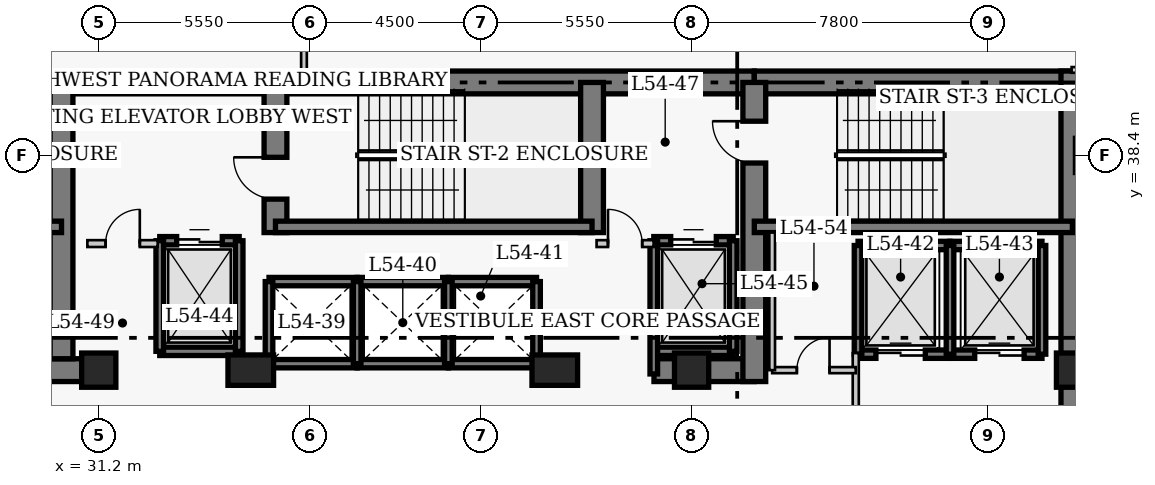
"""IFC4 building model, lengths in metres.
Left out: names, types, materials, properties, quantities, classifications, styles, units other than length and angle.
Written with IfcOpenShell. Run it as: python <this file> out.ifc"""

import sys

from ifc_helpers import new_model, si_unit, direction, frame, frame_2d, origin, origin_2d, place, context, subcontext, project, spatial, rectangle, extrude, element, fill, save


model = new_model("IFC4")
c1 = context("Model", 3, precision=1e-05, world=origin(), true_north=direction((0.0, 1.0)))
c2 = subcontext(c1, "Body", "Model", "MODEL_VIEW")
j1 = project(units=[si_unit("LENGTHUNIT", "METRE"), si_unit("PLANEANGLEUNIT", "RADIAN")], contexts=[c1])
p1 = place(None, origin())
s1 = spatial("IfcSite", under=j1, at=p1, CompositionType="ELEMENT")
p2 = place(p1, origin())
s2 = spatial("IfcBuilding", under=s1, at=p2, CompositionType="ELEMENT")
p3 = place(p2, frame((0.0, 0.0, 216.3)))
s3 = spatial("IfcBuildingStorey", under=s2, at=p3, CompositionType="ELEMENT", Elevation=216.3)
p4 = place(p3, frame((21.6, 40.32, 0.0), z_axis=(0.0, 0.0, 1.0), x_axis=(1.0, 0.0, 0.0)))
e1 = element("IfcWall", 1, at=p4, inside=s3, PredefinedType="SHEAR", context=c2, shape_type="SweptSolid", body=[
    extrude(rectangle(XDim=14.25, YDim=0.6, at=frame_2d((7.125, 0.0))), origin(), (0.0, 0.0, 1.0), 3.9),
])
p5 = place(p3, frame((35.85, 40.32, 0.0), z_axis=(0.0, 0.0, 1.0), x_axis=(1.0, 0.0, 0.0)))
e2 = element("IfcWall", 2, at=p5, inside=s3, PredefinedType="SHEAR", context=c2, shape_type="SweptSolid", body=[
    extrude(rectangle(XDim=12.6, YDim=0.6, at=frame_2d((6.3, 0.0))), origin(), (0.0, 0.0, 1.0), 3.9),
])
p6 = place(p3, frame((48.45, 40.32, 0.0), z_axis=(0.0, 0.0, 1.0), x_axis=(1.0, 0.0, 0.0)))
e3 = element("IfcWall", 3, at=p6, inside=s3, PredefinedType="SHEAR", context=c2, shape_type="SweptSolid", body=[
    extrude(rectangle(XDim=8.67, YDim=0.6, at=frame_2d((4.335, 0.0))), origin(), (0.0, 0.0, 1.0), 3.9),
])
p7 = place(p3, frame((56.82, 27.05, 0.0), z_axis=(0.0, 0.0, 1.0), x_axis=(0.0, 1.0, 0.0)))
e4 = element("IfcWall", 4, at=p7, inside=s3, PredefinedType="SHEAR", context=c2, shape_type="SweptSolid", body=[
    extrude(rectangle(XDim=13.57, YDim=0.6, at=frame_2d((6.785, 0.0))), origin(), (0.0, 0.0, 1.0), 3.9),
])
p8 = place(p3, frame((28.45, 32.75, 0.0), z_axis=(0.0, 0.0, 1.0), x_axis=(1.0, 0.0, 0.0)))
e5 = element("IfcWall", 5, at=p8, inside=s3, PredefinedType="SHEAR", context=c2, shape_type="SweptSolid", body=[
    extrude(rectangle(XDim=2.4, YDim=0.6, at=frame_2d((1.2, 0.0))), origin(), (0.0, 0.0, 1.0), 3.9),
])
p9 = place(p3, frame((45.81, 32.75, 0.0), z_axis=(0.0, 0.0, 1.0), x_axis=(1.0, 0.0, 0.0)))
e6 = element("IfcWall", 6, at=p9, inside=s3, PredefinedType="SHEAR", context=c2, shape_type="SweptSolid", body=[
    extrude(rectangle(XDim=2.64, YDim=0.6, at=frame_2d((1.32, 0.0))), origin(), (0.0, 0.0, 1.0), 3.9),
])
p10 = place(p3, frame((30.22, 33.05, 0.0), z_axis=(0.0, 0.0, 1.0), x_axis=(0.0, 1.0, 0.0)))
e7 = element("IfcWall", 7, at=p10, inside=s3, PredefinedType="SHEAR", context=c2, shape_type="SweptSolid", body=[
    extrude(rectangle(XDim=7.27, YDim=0.6, at=frame_2d((3.635, 0.0))), origin(), (0.0, 0.0, 1.0), 3.9),
])
p11 = place(p3, frame((35.85, 36.37, 0.0), z_axis=(0.0, 0.0, 1.0), x_axis=(0.0, 1.0, 0.0)))
e8 = element("IfcWall", 8, at=p11, inside=s3, PredefinedType="SHEAR", context=c2, shape_type="SweptSolid", body=[
    extrude(rectangle(XDim=3.95, YDim=0.6, at=frame_2d((1.975, 0.0))), origin(), (0.0, 0.0, 1.0), 3.9),
])
p12 = place(p11, frame((0.88, 0.0, 0.0)))
e9 = element("IfcOpeningElement", 9, at=p12, cuts=e8, PredefinedType="OPENING", context=c2, shape_type="SweptSolid", body=[
    extrude(rectangle(XDim=1.1, YDim=2.15, at=frame_2d((0.55, 1.075))), frame((0.0, 0.31, 0.0), z_axis=(0.0, -1.0, 0.0), x_axis=(1.0, 0.0, 0.0)), (0.0, 0.0, 1.0), 0.62),
])
p13 = place(p3, frame((44.18, 36.37, 0.0), z_axis=(0.0, 0.0, 1.0), x_axis=(0.0, 1.0, 0.0)))
e10 = element("IfcWall", 10, at=p13, inside=s3, PredefinedType="SHEAR", context=c2, shape_type="SweptSolid", body=[
    extrude(rectangle(XDim=3.95, YDim=0.6, at=frame_2d((1.975, 0.0))), origin(), (0.0, 0.0, 1.0), 3.9),
])
p14 = place(p3, frame((48.45, 32.45, 0.0), z_axis=(0.0, 0.0, 1.0), x_axis=(0.0, 1.0, 0.0)))
e11 = element("IfcWall", 11, at=p14, inside=s3, PredefinedType="SHEAR", context=c2, shape_type="SweptSolid", body=[
    extrude(rectangle(XDim=7.87, YDim=0.6, at=frame_2d((3.935, 0.0))), origin(), (0.0, 0.0, 1.0), 3.9),
])
p15 = place(p14, frame((5.75, 0.0, 0.0)))
e12 = element("IfcOpeningElement", 12, at=p15, cuts=e11, PredefinedType="OPENING", context=c2, shape_type="SweptSolid", body=[
    extrude(rectangle(XDim=1.1, YDim=2.15, at=frame_2d((0.55, 1.075))), frame((0.0, 0.31, 0.0), z_axis=(0.0, -1.0, 0.0), x_axis=(1.0, 0.0, 0.0)), (0.0, 0.0, 1.0), 0.62),
])
p16 = place(p3, frame((21.9, 36.52, 0.0), z_axis=(0.0, 0.0, 1.0), x_axis=(1.0, 0.0, 0.0)))
e13 = element("IfcWall", 13, at=p16, inside=s3, PredefinedType="SHEAR", context=c2, shape_type="SweptSolid", body=[
    extrude(rectangle(XDim=8.32, YDim=0.3, at=frame_2d((4.16, 0.0))), origin(), (0.0, 0.0, 1.0), 3.9),
])
p17 = place(p16, frame((0.9, 0.0, 0.0)))
e14 = element("IfcOpeningElement", 14, at=p17, cuts=e13, PredefinedType="OPENING", context=c2, shape_type="SweptSolid", body=[
    extrude(rectangle(XDim=1.1, YDim=2.15, at=frame_2d((0.55, 1.075))), frame((0.0, 0.16, 0.0), z_axis=(0.0, -1.0, 0.0), x_axis=(1.0, 0.0, 0.0)), (0.0, 0.0, 1.0), 0.32),
])
p18 = place(p3, frame((35.85, 36.52, 0.0), z_axis=(0.0, 0.0, 1.0), x_axis=(1.0, 0.0, 0.0)))
e15 = element("IfcWall", 15, at=p18, inside=s3, PredefinedType="SHEAR", context=c2, shape_type="SweptSolid", body=[
    extrude(rectangle(XDim=8.33, YDim=0.3, at=frame_2d((4.165, 0.0))), origin(), (0.0, 0.0, 1.0), 3.9),
])
p19 = place(p3, frame((48.45, 36.52, 0.0), z_axis=(0.0, 0.0, 1.0), x_axis=(1.0, 0.0, 0.0)))
e16 = element("IfcWall", 16, at=p19, inside=s3, PredefinedType="SHEAR", context=c2, shape_type="SweptSolid", body=[
    extrude(rectangle(XDim=8.37, YDim=0.3, at=frame_2d((4.185, 0.0))), origin(), (0.0, 0.0, 1.0), 3.9),
])
p20 = place(p3, frame((31.2, 32.75, 0.0), z_axis=(0.0, 0.0, 1.0), x_axis=(1.0, 0.0, 0.0)))
e17 = element("IfcColumn", 17, at=p20, inside=s3, PredefinedType="COLUMN", context=c2, shape_type="SweptSolid", body=[
    extrude(rectangle(XDim=0.9, YDim=0.9, at=origin_2d()), origin(), (0.0, 0.0, 1.0), 3.9),
])
for number, where, z_axis, x_axis in (
    (18, (35.2, 32.75, 0.0), (0.0, 0.0, 1.0), (1.0, 0.0, 0.0)),
    (19, (43.2, 32.75, 0.0), (0.0, 0.0, 1.0), (1.0, 0.0, 0.0)),
):
    element("IfcColumn", number, at=place(p3, frame(where, z_axis=z_axis, x_axis=x_axis)), inside=s3, PredefinedType="COLUMN", context=c2, shape_type="SweptSolid", body=[
        extrude(rectangle(XDim=1.2, YDim=0.8, at=origin_2d()), origin(), (0.0, 0.0, 1.0), 3.9),
    ])
for number, where, z_axis, x_axis in (
    (20, (46.8, 32.75, 0.0), (0.0, 0.0, 1.0), (1.0, 0.0, 0.0)),
    (21, (56.85, 32.75, 0.0), (0.0, 0.0, 1.0), (1.0, 0.0, 0.0)),
):
    element("IfcColumn", number, at=place(p3, frame(where, z_axis=z_axis, x_axis=x_axis)), inside=s3, PredefinedType="COLUMN", context=c2, shape_type="SweptSolid", body=[
        extrude(rectangle(XDim=0.9, YDim=0.9, at=origin_2d()), origin(), (0.0, 0.0, 1.0), 3.9),
    ])
for number, where, z_axis, x_axis in (
    (22, (35.68, 35.08, 0.0), (0.0, 0.0, 1.0), (1.0, 0.0, 0.0)),
    (23, (35.68, 32.92, 0.0), (0.0, 0.0, 1.0), (1.0, 0.0, 0.0)),
):
    element("IfcWall", number, at=place(p3, frame(where, z_axis=z_axis, x_axis=x_axis)), inside=s3, PredefinedType="SHEAR", context=c2, shape_type="SweptSolid", body=[
        extrude(rectangle(XDim=2.32, YDim=0.22, at=frame_2d((1.16, 0.0))), origin(), (0.0, 0.0, 1.0), 3.9),
    ])
p21 = place(p3, frame((35.68, 32.92, 0.0), z_axis=(0.0, 0.0, 1.0), x_axis=(0.0, 1.0, 0.0)))
e24 = element("IfcWall", 24, at=p21, inside=s3, PredefinedType="SHEAR", context=c2, shape_type="SweptSolid", body=[
    extrude(rectangle(XDim=2.16, YDim=0.2, at=frame_2d((1.08, 0.0))), origin(), (0.0, 0.0, 1.0), 3.9),
])
for number, where, z_axis, x_axis in (
    (25, (38.0, 35.08, 0.0), (0.0, 0.0, 1.0), (1.0, 0.0, 0.0)),
    (26, (38.0, 32.92, 0.0), (0.0, 0.0, 1.0), (1.0, 0.0, 0.0)),
):
    element("IfcWall", number, at=place(p3, frame(where, z_axis=z_axis, x_axis=x_axis)), inside=s3, PredefinedType="SHEAR", context=c2, shape_type="SweptSolid", body=[
        extrude(rectangle(XDim=2.4, YDim=0.22, at=frame_2d((1.2, 0.0))), origin(), (0.0, 0.0, 1.0), 3.9),
    ])
p22 = place(p3, frame((38.0, 32.92, 0.0), z_axis=(0.0, 0.0, 1.0), x_axis=(0.0, 1.0, 0.0)))
e27 = element("IfcWall", 27, at=p22, inside=s3, PredefinedType="SHEAR", context=c2, shape_type="SweptSolid", body=[
    extrude(rectangle(XDim=2.16, YDim=0.2, at=frame_2d((1.08, 0.0))), origin(), (0.0, 0.0, 1.0), 3.9),
])
for number, where, z_axis, x_axis in (
    (28, (40.4, 35.08, 0.0), (0.0, 0.0, 1.0), (1.0, 0.0, 0.0)),
    (29, (40.4, 32.92, 0.0), (0.0, 0.0, 1.0), (1.0, 0.0, 0.0)),
):
    element("IfcWall", number, at=place(p3, frame(where, z_axis=z_axis, x_axis=x_axis)), inside=s3, PredefinedType="SHEAR", context=c2, shape_type="SweptSolid", body=[
        extrude(rectangle(XDim=2.32, YDim=0.22, at=frame_2d((1.16, 0.0))), origin(), (0.0, 0.0, 1.0), 3.9),
    ])
for number, where, z_axis, x_axis in (
    (30, (40.4, 32.92, 0.0), (0.0, 0.0, 1.0), (0.0, 1.0, 0.0)),
    (31, (42.72, 32.92, 0.0), (0.0, 0.0, 1.0), (0.0, 1.0, 0.0)),
):
    element("IfcWall", number, at=place(p3, frame(where, z_axis=z_axis, x_axis=x_axis)), inside=s3, PredefinedType="SHEAR", context=c2, shape_type="SweptSolid", body=[
        extrude(rectangle(XDim=2.16, YDim=0.2, at=frame_2d((1.08, 0.0))), origin(), (0.0, 0.0, 1.0), 3.9),
    ])
p23 = place(p3, frame((51.18, 36.03, 0.0), z_axis=(0.0, 0.0, 1.0), x_axis=(1.0, 0.0, 0.0)))
e32 = element("IfcWall", 32, at=p23, inside=s3, PredefinedType="SHEAR", context=c2, shape_type="SweptSolid", body=[
    extrude(rectangle(XDim=2.42, YDim=0.22, at=frame_2d((1.21, 0.0))), origin(), (0.0, 0.0, 1.0), 3.9),
])
p24 = place(p3, frame((51.18, 33.17, 0.0), z_axis=(0.0, 0.0, 1.0), x_axis=(1.0, 0.0, 0.0)))
e33 = element("IfcWall", 33, at=p24, inside=s3, PredefinedType="SHEAR", context=c2, shape_type="SweptSolid", body=[
    extrude(rectangle(XDim=2.42, YDim=0.22, at=frame_2d((1.21, 0.0))), origin(), (0.0, 0.0, 1.0), 3.9),
])
p25 = place(p24, frame((0.47, 0.0, 0.0)))
e34 = element("IfcOpeningElement", 34, at=p25, cuts=e33, PredefinedType="OPENING", context=c2, shape_type="SweptSolid", body=[
    extrude(rectangle(XDim=1.3, YDim=2.15, at=frame_2d((0.65, 1.075))), frame((0.0, 0.12, 0.0), z_axis=(0.0, -1.0, 0.0), x_axis=(1.0, 0.0, 0.0)), (0.0, 0.0, 1.0), 0.24),
])
p26 = place(p3, frame((51.18, 33.17, 0.0), z_axis=(0.0, 0.0, 1.0), x_axis=(0.0, 1.0, 0.0)))
e35 = element("IfcWall", 35, at=p26, inside=s3, PredefinedType="SHEAR", context=c2, shape_type="SweptSolid", body=[
    extrude(rectangle(XDim=2.86, YDim=0.2, at=frame_2d((1.43, 0.0))), origin(), (0.0, 0.0, 1.0), 3.9),
])
p27 = place(p3, frame((53.6, 36.03, 0.0), z_axis=(0.0, 0.0, 1.0), x_axis=(1.0, 0.0, 0.0)))
e36 = element("IfcWall", 36, at=p27, inside=s3, PredefinedType="SHEAR", context=c2, shape_type="SweptSolid", body=[
    extrude(rectangle(XDim=2.42, YDim=0.22, at=frame_2d((1.21, 0.0))), origin(), (0.0, 0.0, 1.0), 3.9),
])
p28 = place(p3, frame((53.6, 33.17, 0.0), z_axis=(0.0, 0.0, 1.0), x_axis=(1.0, 0.0, 0.0)))
e37 = element("IfcWall", 37, at=p28, inside=s3, PredefinedType="SHEAR", context=c2, shape_type="SweptSolid", body=[
    extrude(rectangle(XDim=2.42, YDim=0.22, at=frame_2d((1.21, 0.0))), origin(), (0.0, 0.0, 1.0), 3.9),
])
p29 = place(p28, frame((0.65, 0.0, 0.0)))
e38 = element("IfcOpeningElement", 38, at=p29, cuts=e37, PredefinedType="OPENING", context=c2, shape_type="SweptSolid", body=[
    extrude(rectangle(XDim=1.3, YDim=2.15, at=frame_2d((0.65, 1.075))), frame((0.0, 0.12, 0.0), z_axis=(0.0, -1.0, 0.0), x_axis=(1.0, 0.0, 0.0)), (0.0, 0.0, 1.0), 0.24),
])
for number, where, z_axis, x_axis in (
    (39, (53.6, 33.17, 0.0), (0.0, 0.0, 1.0), (0.0, 1.0, 0.0)),
    (40, (56.02, 33.17, 0.0), (0.0, 0.0, 1.0), (0.0, 1.0, 0.0)),
):
    element("IfcWall", number, at=place(p3, frame(where, z_axis=z_axis, x_axis=x_axis)), inside=s3, PredefinedType="SHEAR", context=c2, shape_type="SweptSolid", body=[
        extrude(rectangle(XDim=2.86, YDim=0.2, at=frame_2d((1.43, 0.0))), origin(), (0.0, 0.0, 1.0), 3.9),
    ])
p30 = place(p3, frame((32.805, 36.155, 0.0), z_axis=(0.0, 0.0, 1.0), x_axis=(1.0, 0.0, 0.0)))
e41 = element("IfcWall", 41, at=p30, inside=s3, PredefinedType="SHEAR", context=c2, shape_type="SweptSolid", body=[
    extrude(rectangle(XDim=2.09, YDim=0.22, at=frame_2d((1.045, 0.0))), origin(), (0.0, 0.0, 1.0), 3.9),
])
p31 = place(p30, frame((0.445, 0.0, 0.0)))
e42 = element("IfcOpeningElement", 42, at=p31, cuts=e41, PredefinedType="OPENING", context=c2, shape_type="SweptSolid", body=[
    extrude(rectangle(XDim=1.2, YDim=2.15, at=frame_2d((0.6, 1.075))), frame((0.0, 0.12, 0.0), z_axis=(0.0, -1.0, 0.0), x_axis=(1.0, 0.0, 0.0)), (0.0, 0.0, 1.0), 0.24),
])
p32 = place(p3, frame((32.805, 33.245, 0.0), z_axis=(0.0, 0.0, 1.0), x_axis=(1.0, 0.0, 0.0)))
e43 = element("IfcWall", 43, at=p32, inside=s3, PredefinedType="SHEAR", context=c2, shape_type="SweptSolid", body=[
    extrude(rectangle(XDim=2.09, YDim=0.22, at=frame_2d((1.045, 0.0))), origin(), (0.0, 0.0, 1.0), 3.9),
])
for number, where, z_axis, x_axis in (
    (44, (32.805, 33.245, 0.0), (0.0, 0.0, 1.0), (0.0, 1.0, 0.0)),
    (45, (34.895, 33.245, 0.0), (0.0, 0.0, 1.0), (0.0, 1.0, 0.0)),
):
    element("IfcWall", number, at=place(p3, frame(where, z_axis=z_axis, x_axis=x_axis)), inside=s3, PredefinedType="SHEAR", context=c2, shape_type="SweptSolid", body=[
        extrude(rectangle(XDim=2.91, YDim=0.2, at=frame_2d((1.455, 0.0))), origin(), (0.0, 0.0, 1.0), 3.9),
    ])
p33 = place(p3, frame((45.805, 36.155, 0.0), z_axis=(0.0, 0.0, 1.0), x_axis=(1.0, 0.0, 0.0)))
e46 = element("IfcWall", 46, at=p33, inside=s3, PredefinedType="SHEAR", context=c2, shape_type="SweptSolid", body=[
    extrude(rectangle(XDim=2.09, YDim=0.22, at=frame_2d((1.045, 0.0))), origin(), (0.0, 0.0, 1.0), 3.9),
])
p34 = place(p33, frame((0.445, 0.0, 0.0)))
e47 = element("IfcOpeningElement", 47, at=p34, cuts=e46, PredefinedType="OPENING", context=c2, shape_type="SweptSolid", body=[
    extrude(rectangle(XDim=1.2, YDim=2.15, at=frame_2d((0.6, 1.075))), frame((0.0, 0.12, 0.0), z_axis=(0.0, -1.0, 0.0), x_axis=(1.0, 0.0, 0.0)), (0.0, 0.0, 1.0), 0.24),
])
p35 = place(p3, frame((45.805, 33.245, 0.0), z_axis=(0.0, 0.0, 1.0), x_axis=(1.0, 0.0, 0.0)))
e48 = element("IfcWall", 48, at=p35, inside=s3, PredefinedType="SHEAR", context=c2, shape_type="SweptSolid", body=[
    extrude(rectangle(XDim=2.09, YDim=0.22, at=frame_2d((1.045, 0.0))), origin(), (0.0, 0.0, 1.0), 3.9),
])
p36 = place(p3, frame((45.805, 32.65, 0.0), z_axis=(0.0, 0.0, 1.0), x_axis=(0.0, 1.0, 0.0)))
e49 = element("IfcWall", 49, at=p36, inside=s3, PredefinedType="SHEAR", context=c2, shape_type="SweptSolid", body=[
    extrude(rectangle(XDim=3.505, YDim=0.2, at=frame_2d((1.752, 0.0))), origin(), (0.0, 0.0, 1.0), 3.9),
])
p37 = place(p3, frame((47.895, 33.245, 0.0), z_axis=(0.0, 0.0, 1.0), x_axis=(0.0, 1.0, 0.0)))
e50 = element("IfcWall", 50, at=p37, inside=s3, PredefinedType="SHEAR", context=c2, shape_type="SweptSolid", body=[
    extrude(rectangle(XDim=2.91, YDim=0.2, at=frame_2d((1.455, 0.0))), origin(), (0.0, 0.0, 1.0), 3.9),
])
p38 = place(p3, frame((30.9, 36.08, 0.0), z_axis=(0.0, 0.0, 1.0), x_axis=(1.0, 0.0, 0.0)))
e51 = element("IfcWall", 51, at=p38, inside=s3, PredefinedType="PARTITIONING", context=c2, shape_type="SweptSolid", body=[
    extrude(rectangle(XDim=1.85, YDim=0.18, at=frame_2d((0.925, 0.0))), origin(), (0.0, 0.0, 1.0), 3.65),
])
p39 = place(p38, frame((0.48, 0.0, 0.0)))
e52 = element("IfcOpeningElement", 52, at=p39, cuts=e51, PredefinedType="OPENING", context=c2, shape_type="SweptSolid", body=[
    extrude(rectangle(XDim=0.9, YDim=2.15, at=frame_2d((0.45, 1.075))), frame((0.0, 0.1, 0.0), z_axis=(0.0, -1.0, 0.0), x_axis=(1.0, 0.0, 0.0)), (0.0, 0.0, 1.0), 0.2),
])
p40 = place(p3, frame((44.3, 36.08, 0.0), z_axis=(0.0, 0.0, 1.0), x_axis=(1.0, 0.0, 0.0)))
e53 = element("IfcWall", 53, at=p40, inside=s3, PredefinedType="PARTITIONING", context=c2, shape_type="SweptSolid", body=[
    extrude(rectangle(XDim=1.5, YDim=0.18, at=frame_2d((0.75, 0.0))), origin(), (0.0, 0.0, 1.0), 3.65),
])
p41 = place(p40, frame((0.3, 0.0, 0.0)))
e54 = element("IfcOpeningElement", 54, at=p41, cuts=e53, PredefinedType="OPENING", context=c2, shape_type="SweptSolid", body=[
    extrude(rectangle(XDim=0.9, YDim=2.15, at=frame_2d((0.45, 1.075))), frame((0.0, 0.1, 0.0), z_axis=(0.0, -1.0, 0.0), x_axis=(1.0, 0.0, 0.0)), (0.0, 0.0, 1.0), 0.2),
])
p42 = place(p3, frame((51.12, 29.5, 0.0), z_axis=(0.0, 0.0, 1.0), x_axis=(0.0, 1.0, 0.0)))
e55 = element("IfcWall", 55, at=p42, inside=s3, PredefinedType="PARTITIONING", context=c2, shape_type="SweptSolid", body=[
    extrude(rectangle(XDim=3.7, YDim=0.16, at=frame_2d((1.85, 0.0))), origin(), (0.0, 0.0, 1.0), 3.65),
])
p43 = place(p42, frame((0.9, 0.0, 0.0)))
e56 = element("IfcOpeningElement", 56, at=p43, cuts=e55, PredefinedType="OPENING", context=c2, shape_type="SweptSolid", body=[
    extrude(rectangle(XDim=1.1, YDim=2.15, at=frame_2d((0.55, 1.075))), frame((0.0, 0.09, 0.0), z_axis=(0.0, -1.0, 0.0), x_axis=(1.0, 0.0, 0.0)), (0.0, 0.0, 1.0), 0.18),
])
p44 = place(p3, frame((48.92, 32.75, 0.0), z_axis=(0.0, 0.0, 1.0), x_axis=(1.0, 0.0, 0.0)))
e57 = element("IfcWall", 57, at=p44, inside=s3, PredefinedType="PARTITIONING", context=c2, shape_type="SweptSolid", body=[
    extrude(rectangle(XDim=2.2, YDim=0.16, at=frame_2d((1.1, 0.0))), origin(), (0.0, 0.0, 1.0), 3.65),
])
p45 = place(p44, frame((0.65, 0.0, 0.0)))
e58 = element("IfcOpeningElement", 58, at=p45, cuts=e57, PredefinedType="OPENING", context=c2, shape_type="SweptSolid", body=[
    extrude(rectangle(XDim=0.86, YDim=2.05, at=frame_2d((0.43, 1.025))), frame((0.0, 0.09, 0.0), z_axis=(0.0, -1.0, 0.0), x_axis=(1.0, 0.0, 0.0)), (0.0, 0.0, 1.0), 0.18),
])
p46 = place(p3, frame((48.92, 32.75, 0.0), z_axis=(0.0, 0.0, 1.0), x_axis=(0.0, 1.0, 0.0)))
e59 = element("IfcWall", 59, at=p46, inside=s3, PredefinedType="PARTITIONING", context=c2, shape_type="SweptSolid", body=[
    extrude(rectangle(XDim=3.62, YDim=0.15, at=frame_2d((1.81, 0.0))), origin(), (0.0, 0.0, 1.0), 3.65),
])
p47 = place(p3, frame((56.8, 40.65, 0.0), z_axis=(0.0, 0.0, 1.0), x_axis=(1.0, 0.0, 0.0)))
e60 = element("IfcWall", 60, at=p47, inside=s3, PredefinedType="PARTITIONING", context=c2, shape_type="SweptSolid", body=[
    extrude(rectangle(XDim=3.66, YDim=0.15, at=frame_2d((1.83, 0.0))), origin(), (0.0, 0.0, 1.0), 3.65),
])
p48 = place(p47, frame((2.05, 0.0, 0.0)))
e61 = element("IfcOpeningElement", 61, at=p48, cuts=e60, PredefinedType="OPENING", context=c2, shape_type="SweptSolid", body=[
    extrude(rectangle(XDim=1.0, YDim=2.15, at=frame_2d((0.5, 1.075))), frame((0.0, 0.085, 0.0), z_axis=(0.0, -1.0, 0.0), x_axis=(1.0, 0.0, 0.0)), (0.0, 0.0, 1.0), 0.17),
])
p49 = place(p3, frame((36.6, 40.32, 0.0), z_axis=(0.0, 0.0, 1.0), x_axis=(0.0, 1.0, 0.0)))
e62 = element("IfcWall", 62, at=p49, inside=s3, PredefinedType="PARTITIONING", context=c2, shape_type="SweptSolid", body=[
    extrude(rectangle(XDim=2.345, YDim=0.15, at=frame_2d((1.172, 0.0))), origin(), (0.0, 0.0, 1.0), 3.65),
])
p50 = place(p25, origin())
e63 = element("IfcDoor", 63, at=p50, inside=s3, OperationType="DOUBLE_DOOR_SLIDING", PredefinedType="DOOR", context=c2, shape_type="SweptSolid", body=[
    extrude(rectangle(XDim=1.3, YDim=2.15, at=frame_2d((0.65, 1.075))), frame((0.0, 0.025, 0.0), z_axis=(0.0, -1.0, 0.0), x_axis=(1.0, 0.0, 0.0)), (0.0, 0.0, 1.0), 0.05),
])
fill(e34, e63)
p51 = place(p29, origin())
e64 = element("IfcDoor", 64, at=p51, inside=s3, OperationType="DOUBLE_DOOR_SLIDING", PredefinedType="DOOR", context=c2, shape_type="SweptSolid", body=[
    extrude(rectangle(XDim=1.3, YDim=2.15, at=frame_2d((0.65, 1.075))), frame((0.0, 0.025, 0.0), z_axis=(0.0, -1.0, 0.0), x_axis=(1.0, 0.0, 0.0)), (0.0, 0.0, 1.0), 0.05),
])
fill(e38, e64)
p52 = place(p31, origin())
e65 = element("IfcDoor", 65, at=p52, inside=s3, OperationType="DOUBLE_DOOR_SLIDING", PredefinedType="DOOR", context=c2, shape_type="SweptSolid", body=[
    extrude(rectangle(XDim=1.2, YDim=2.15, at=frame_2d((0.6, 1.075))), frame((0.0, 0.025, 0.0), z_axis=(0.0, -1.0, 0.0), x_axis=(1.0, 0.0, 0.0)), (0.0, 0.0, 1.0), 0.05),
])
fill(e42, e65)
p53 = place(p34, origin())
e66 = element("IfcDoor", 66, at=p53, inside=s3, OperationType="DOUBLE_DOOR_SLIDING", PredefinedType="DOOR", context=c2, shape_type="SweptSolid", body=[
    extrude(rectangle(XDim=1.2, YDim=2.15, at=frame_2d((0.6, 1.075))), frame((0.0, 0.025, 0.0), z_axis=(0.0, -1.0, 0.0), x_axis=(1.0, 0.0, 0.0)), (0.0, 0.0, 1.0), 0.05),
])
fill(e47, e66)
p54 = place(p39, origin())
e67 = element("IfcDoor", 67, at=p54, inside=s3, OperationType="SINGLE_SWING_RIGHT", PredefinedType="DOOR", context=c2, shape_type="SweptSolid", body=[
    extrude(rectangle(XDim=0.9, YDim=2.15, at=frame_2d((0.45, 1.075))), frame((0.0, 0.025, 0.0), z_axis=(0.0, -1.0, 0.0), x_axis=(1.0, 0.0, 0.0)), (0.0, 0.0, 1.0), 0.05),
])
fill(e52, e67)
p55 = place(p41, origin())
e68 = element("IfcDoor", 68, at=p55, inside=s3, OperationType="SINGLE_SWING_LEFT", PredefinedType="DOOR", context=c2, shape_type="SweptSolid", body=[
    extrude(rectangle(XDim=0.9, YDim=2.15, at=frame_2d((0.45, 1.075))), frame((0.0, 0.025, 0.0), z_axis=(0.0, -1.0, 0.0), x_axis=(1.0, 0.0, 0.0)), (0.0, 0.0, 1.0), 0.05),
])
fill(e54, e68)
p56 = place(p45, origin())
e69 = element("IfcDoor", 69, at=p56, inside=s3, OperationType="SINGLE_SWING_RIGHT", PredefinedType="DOOR", context=c2, shape_type="SweptSolid", body=[
    extrude(rectangle(XDim=0.86, YDim=2.05, at=frame_2d((0.43, 1.025))), frame((0.0, 0.025, 0.0), z_axis=(0.0, -1.0, 0.0), x_axis=(1.0, 0.0, 0.0)), (0.0, 0.0, 1.0), 0.05),
])
fill(e58, e69)
p57 = place(p12, origin())
e70 = element("IfcDoor", 70, at=p57, inside=s3, OperationType="SINGLE_SWING_RIGHT", PredefinedType="DOOR", context=c2, shape_type="SweptSolid", body=[
    extrude(rectangle(XDim=1.1, YDim=2.15, at=frame_2d((0.55, 1.075))), frame((0.0, 0.025, 0.0), z_axis=(0.0, -1.0, 0.0), x_axis=(1.0, 0.0, 0.0)), (0.0, 0.0, 1.0), 0.05),
])
fill(e9, e70)
p58 = place(p15, origin())
e71 = element("IfcDoor", 71, at=p58, inside=s3, OperationType="SINGLE_SWING_RIGHT", PredefinedType="DOOR", context=c2, shape_type="SweptSolid", body=[
    extrude(rectangle(XDim=1.1, YDim=2.15, at=frame_2d((0.55, 1.075))), frame((0.0, 0.025, 0.0), z_axis=(0.0, -1.0, 0.0), x_axis=(1.0, 0.0, 0.0)), (0.0, 0.0, 1.0), 0.05),
])
fill(e12, e71)
save(model, sys.argv[1])
